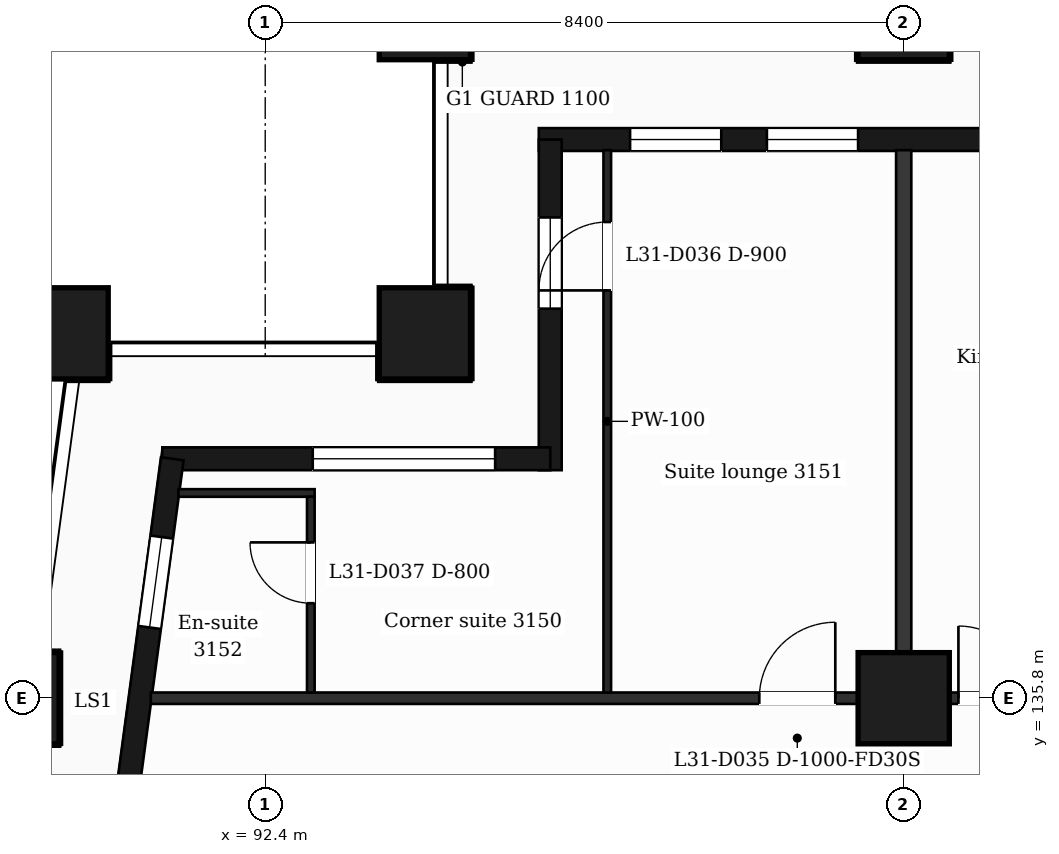
"""IFC4 building model, lengths in metres.
Left out: names, types, materials, properties, quantities, classifications, styles, units other than length and angle.
Written with IfcOpenShell. Run it as: python <this file> out.ifc"""

import sys

from ifc_helpers import new_model, si_unit, direction, frame, frame_2d, origin, origin_2d, place, context, subcontext, project, spatial, rectangle, extrude, element, fill, save


model = new_model("IFC4")
c1 = context("Model", 3, precision=1e-05, world=origin(), true_north=direction((0.0, 1.0)))
c2 = subcontext(c1, "Body", "Model", "MODEL_VIEW")
j1 = project(units=[si_unit("LENGTHUNIT", "METRE"), si_unit("PLANEANGLEUNIT", "RADIAN")], contexts=[c1])
p1 = place(None, origin())
s1 = spatial("IfcSite", under=j1, at=p1, CompositionType="ELEMENT")
p2 = place(p1, origin())
s2 = spatial("IfcBuilding", under=s1, at=p2, CompositionType="ELEMENT")
p3 = place(p2, frame((0.0, 0.0, 131.7)))
s3 = spatial("IfcBuildingStorey", under=s2, at=p3, CompositionType="ELEMENT", Elevation=131.7)
for number, where, z_axis, x_axis in (
    (1, (94.5, 140.6, 0.0), (0.0, 0.0, 1.0), (1.0, 0.0, 0.0)),
    (2, (89.735, 140.6, 0.0), (0.0, 0.0, 1.0), (1.0, 0.0, 0.0)),
    (3, (100.8, 135.8, 0.0), (0.0, 0.0, 1.0), (1.0, 0.0, 0.0)),
    (4, (89.088, 135.8, 0.0), (0.0, 0.0, 1.0), (1.0, 0.0, 0.0)),
    (5, (100.8, 144.8, 0.0), (0.0, 0.0, 1.0), (1.0, 0.0, 0.0)),
    (6, (94.5, 144.8, 0.0), (0.0, 0.0, 1.0), (1.0, 0.0, 0.0)),
):
    element("IfcColumn", number, at=place(p3, frame(where, z_axis=z_axis, x_axis=x_axis)), inside=s3, PredefinedType="COLUMN", context=c2, shape_type="SweptSolid", body=[
        extrude(rectangle(XDim=1.2, YDim=1.2, at=origin_2d()), origin(), (0.0, 0.0, 1.0), 3.7),
    ])
p4 = place(p3, frame((112.5, 143.15, 0.0), z_axis=(0.0, 0.0, 1.0), x_axis=(-1.0, 0.0, 0.0)))
e7 = element("IfcWall", 7, at=p4, inside=s3, PredefinedType="SOLIDWALL", context=c2, shape_type="SweptSolid", body=[
    extrude(rectangle(XDim=16.5, YDim=0.3, at=frame_2d((8.25, 0.0))), origin(), (0.0, 0.0, 1.0), 3.2),
])
p5 = place(p4, frame((1.1, 0.0, 0.9)))
e8 = element("IfcOpeningElement", 8, at=p5, cuts=e7, PredefinedType="OPENING", context=c2, shape_type="SweptSolid", body=[
    extrude(rectangle(XDim=1.2, YDim=2.1, at=frame_2d((0.6, 1.05))), frame((0.0, 0.16, 0.0), z_axis=(0.0, -1.0, 0.0), x_axis=(1.0, 0.0, 0.0)), (0.0, 0.0, 1.0), 0.32),
])
p6 = place(p4, frame((4.2, 0.0, 0.9)))
e9 = element("IfcOpeningElement", 9, at=p6, cuts=e7, PredefinedType="OPENING", context=c2, shape_type="SweptSolid", body=[
    extrude(rectangle(XDim=2.4, YDim=2.1, at=frame_2d((1.2, 1.05))), frame((0.0, 0.16, 0.0), z_axis=(0.0, -1.0, 0.0), x_axis=(1.0, 0.0, 0.0)), (0.0, 0.0, 1.0), 0.32),
])
p7 = place(p4, frame((9.0, 0.0, 0.0)))
e10 = element("IfcOpeningElement", 10, at=p7, cuts=e7, PredefinedType="OPENING", context=c2, shape_type="SweptSolid", body=[
    extrude(rectangle(XDim=1.2, YDim=2.4, at=frame_2d((0.6, 1.2))), frame((0.0, 0.16, 0.0), z_axis=(0.0, -1.0, 0.0), x_axis=(1.0, 0.0, 0.0)), (0.0, 0.0, 1.0), 0.32),
])
p8 = place(p4, frame((12.3, 0.0, 0.9)))
e11 = element("IfcOpeningElement", 11, at=p8, cuts=e7, PredefinedType="OPENING", context=c2, shape_type="SweptSolid", body=[
    extrude(rectangle(XDim=1.2, YDim=2.1, at=frame_2d((0.6, 1.05))), frame((0.0, 0.16, 0.0), z_axis=(0.0, -1.0, 0.0), x_axis=(1.0, 0.0, 0.0)), (0.0, 0.0, 1.0), 0.32),
])
p9 = place(p4, frame((14.1, 0.0, 0.9)))
e12 = element("IfcOpeningElement", 12, at=p9, cuts=e7, PredefinedType="OPENING", context=c2, shape_type="SweptSolid", body=[
    extrude(rectangle(XDim=1.2, YDim=2.1, at=frame_2d((0.6, 1.05))), frame((0.0, 0.16, 0.0), z_axis=(0.0, -1.0, 0.0), x_axis=(1.0, 0.0, 0.0)), (0.0, 0.0, 1.0), 0.32),
])
p10 = place(p3, frame((96.15, 143.15, 0.0), z_axis=(0.0, 0.0, 1.0), x_axis=(0.0, -1.0, 0.0)))
e13 = element("IfcWall", 13, at=p10, inside=s3, PredefinedType="SOLIDWALL", context=c2, shape_type="SweptSolid", body=[
    extrude(rectangle(XDim=4.35, YDim=0.3, at=frame_2d((2.175, 0.0))), origin(), (0.0, 0.0, 1.0), 3.2),
])
p11 = place(p10, frame((1.025, 0.0, 0.9)))
e14 = element("IfcOpeningElement", 14, at=p11, cuts=e13, PredefinedType="OPENING", context=c2, shape_type="SweptSolid", body=[
    extrude(rectangle(XDim=1.2, YDim=2.1, at=frame_2d((0.6, 1.05))), frame((0.0, 0.16, 0.0), z_axis=(0.0, -1.0, 0.0), x_axis=(1.0, 0.0, 0.0)), (0.0, 0.0, 1.0), 0.32),
])
p12 = place(p3, frame((96.15, 138.95, 0.0), z_axis=(0.0, 0.0, 1.0), x_axis=(-1.0, 0.0, 0.0)))
e15 = element("IfcWall", 15, at=p12, inside=s3, PredefinedType="SOLIDWALL", context=c2, shape_type="SweptSolid", body=[
    extrude(rectangle(XDim=5.104, YDim=0.3, at=frame_2d((2.552, 0.0))), origin(), (0.0, 0.0, 1.0), 3.2),
])
p13 = place(p12, frame((0.725, 0.0, 0.9)))
e16 = element("IfcOpeningElement", 16, at=p13, cuts=e15, PredefinedType="OPENING", context=c2, shape_type="SweptSolid", body=[
    extrude(rectangle(XDim=2.4, YDim=2.1, at=frame_2d((1.2, 1.05))), frame((0.0, 0.16, 0.0), z_axis=(0.0, -1.0, 0.0), x_axis=(1.0, 0.0, 0.0)), (0.0, 0.0, 1.0), 0.32),
])
p14 = place(p3, frame((91.177, 138.95, 0.0), z_axis=(0.0, 0.0, 1.0), x_axis=(-0.133426664613, -0.991058689065, 0.0)))
e17 = element("IfcWall", 17, at=p14, inside=s3, PredefinedType="SOLIDWALL", context=c2, shape_type="SweptSolid", body=[
    extrude(rectangle(XDim=6.609, YDim=0.3, at=frame_2d((3.305, 0.0))), origin(), (0.0, 0.0, 1.0), 3.2),
])
p15 = place(p14, frame((1.039, 0.0, 0.9)))
e18 = element("IfcOpeningElement", 18, at=p15, cuts=e17, PredefinedType="OPENING", context=c2, shape_type="SweptSolid", body=[
    extrude(rectangle(XDim=1.2, YDim=2.1, at=frame_2d((0.6, 1.05))), frame((0.0, 0.16, 0.0), z_axis=(0.0, -1.0, 0.0), x_axis=(1.0, 0.0, 0.0)), (0.0, 0.0, 1.0), 0.32),
])
p16 = place(p14, frame((4.294, 0.0, 0.0)))
e19 = element("IfcOpeningElement", 19, at=p16, cuts=e17, PredefinedType="OPENING", context=c2, shape_type="SweptSolid", body=[
    extrude(rectangle(XDim=1.2, YDim=2.4, at=frame_2d((0.6, 1.2))), frame((0.0, 0.16, 0.0), z_axis=(0.0, -1.0, 0.0), x_axis=(1.0, 0.0, 0.0)), (0.0, 0.0, 1.0), 0.32),
])
p17 = place(p3, frame((90.895, 135.8, 0.0), z_axis=(0.0, 0.0, 1.0), x_axis=(1.0, 0.0, 0.0)))
e20 = element("IfcWall", 20, at=p17, inside=s3, PredefinedType="PARTITIONING", context=c2, shape_type="SweptSolid", body=[
    extrude(rectangle(XDim=45.011, YDim=0.15, at=frame_2d((22.505, 0.0))), origin(), (0.0, 0.0, 1.0), 3.2),
])
p18 = place(p17, frame((8.005, 0.0, 0.0)))
e21 = element("IfcOpeningElement", 21, at=p18, cuts=e20, PredefinedType="OPENING", context=c2, shape_type="SweptSolid", body=[
    extrude(rectangle(XDim=1.0, YDim=2.1, at=frame_2d((0.5, 1.05))), frame((0.0, 0.085, 0.0), z_axis=(0.0, -1.0, 0.0), x_axis=(1.0, 0.0, 0.0)), (0.0, 0.0, 1.0), 0.17),
])
p19 = place(p17, frame((10.625, 0.0, 0.0)))
e22 = element("IfcOpeningElement", 22, at=p19, cuts=e20, PredefinedType="OPENING", context=c2, shape_type="SweptSolid", body=[
    extrude(rectangle(XDim=0.95, YDim=2.1, at=frame_2d((0.475, 1.05))), frame((0.0, 0.085, 0.0), z_axis=(0.0, -1.0, 0.0), x_axis=(1.0, 0.0, 0.0)), (0.0, 0.0, 1.0), 0.17),
])
p20 = place(p17, frame((14.38, 0.0, 0.0)))
e23 = element("IfcOpeningElement", 23, at=p20, cuts=e20, PredefinedType="OPENING", context=c2, shape_type="SweptSolid", body=[
    extrude(rectangle(XDim=0.95, YDim=2.1, at=frame_2d((0.475, 1.05))), frame((0.0, 0.085, 0.0), z_axis=(0.0, -1.0, 0.0), x_axis=(1.0, 0.0, 0.0)), (0.0, 0.0, 1.0), 0.17),
])
p21 = place(p17, frame((21.265, 0.0, 0.0)))
e24 = element("IfcOpeningElement", 24, at=p21, cuts=e20, PredefinedType="OPENING", context=c2, shape_type="SweptSolid", body=[
    extrude(rectangle(XDim=0.95, YDim=2.1, at=frame_2d((0.475, 1.05))), frame((0.0, 0.085, 0.0), z_axis=(0.0, -1.0, 0.0), x_axis=(1.0, 0.0, 0.0)), (0.0, 0.0, 1.0), 0.17),
])
p22 = place(p17, frame((30.835, 0.0, 0.0)))
e25 = element("IfcOpeningElement", 25, at=p22, cuts=e20, PredefinedType="OPENING", context=c2, shape_type="SweptSolid", body=[
    extrude(rectangle(XDim=0.95, YDim=2.1, at=frame_2d((0.475, 1.05))), frame((0.0, 0.085, 0.0), z_axis=(0.0, -1.0, 0.0), x_axis=(1.0, 0.0, 0.0)), (0.0, 0.0, 1.0), 0.17),
])
p23 = place(p17, frame((36.555, 0.0, 0.0)))
e26 = element("IfcOpeningElement", 26, at=p23, cuts=e20, PredefinedType="OPENING", context=c2, shape_type="SweptSolid", body=[
    extrude(rectangle(XDim=1.0, YDim=2.1, at=frame_2d((0.5, 1.05))), frame((0.0, 0.085, 0.0), z_axis=(0.0, -1.0, 0.0), x_axis=(1.0, 0.0, 0.0)), (0.0, 0.0, 1.0), 0.17),
])
p24 = place(p3, frame((91.258, 138.5, 0.0), z_axis=(0.0, 0.0, 1.0), x_axis=(1.0, 0.0, 0.0)))
e27 = element("IfcWall", 27, at=p24, inside=s3, PredefinedType="PARTITIONING", context=c2, shape_type="SweptSolid", body=[
    extrude(rectangle(XDim=1.792, YDim=0.1, at=frame_2d((0.896, 0.0))), origin(), (0.0, 0.0, 1.0), 3.2),
])
p25 = place(p3, frame((93.0, 135.875, 0.0), z_axis=(0.0, 0.0, 1.0), x_axis=(0.0, 1.0, 0.0)))
e28 = element("IfcWall", 28, at=p25, inside=s3, PredefinedType="PARTITIONING", context=c2, shape_type="SweptSolid", body=[
    extrude(rectangle(XDim=2.575, YDim=0.1, at=frame_2d((1.288, 0.0))), origin(), (0.0, 0.0, 1.0), 3.2),
])
p26 = place(p25, frame((1.175, 0.0, 0.0)))
e29 = element("IfcOpeningElement", 29, at=p26, cuts=e28, PredefinedType="OPENING", context=c2, shape_type="SweptSolid", body=[
    extrude(rectangle(XDim=0.8, YDim=2.1, at=frame_2d((0.4, 1.05))), frame((0.0, 0.06, 0.0), z_axis=(0.0, -1.0, 0.0), x_axis=(1.0, 0.0, 0.0)), (0.0, 0.0, 1.0), 0.12),
])
p27 = place(p3, frame((96.9, 135.875, 0.0), z_axis=(0.0, 0.0, 1.0), x_axis=(0.0, 1.0, 0.0)))
e30 = element("IfcWall", 30, at=p27, inside=s3, PredefinedType="PARTITIONING", context=c2, shape_type="SweptSolid", body=[
    extrude(rectangle(XDim=7.135, YDim=0.1, at=frame_2d((3.567, 0.0))), origin(), (0.0, 0.0, 1.0), 3.2),
])
p28 = place(p27, frame((5.29, 0.0, 0.0)))
e31 = element("IfcOpeningElement", 31, at=p28, cuts=e30, PredefinedType="OPENING", context=c2, shape_type="SweptSolid", body=[
    extrude(rectangle(XDim=0.9, YDim=2.1, at=frame_2d((0.45, 1.05))), frame((0.0, 0.06, 0.0), z_axis=(0.0, -1.0, 0.0), x_axis=(1.0, 0.0, 0.0)), (0.0, 0.0, 1.0), 0.12),
])
p29 = place(p3, frame((100.8, 135.875, 0.0), z_axis=(0.0, 0.0, 1.0), x_axis=(0.0, 1.0, 0.0)))
e32 = element("IfcWall", 32, at=p29, inside=s3, PredefinedType="PARTITIONING", context=c2, shape_type="SweptSolid", body=[
    extrude(rectangle(XDim=7.135, YDim=0.2, at=frame_2d((3.567, 0.0))), origin(), (0.0, 0.0, 1.0), 3.2),
])
p30 = place(p8, origin())
e33 = element("IfcWindow", 33, at=p30, inside=s3, PartitioningType="SINGLE_PANEL", PredefinedType="WINDOW", context=c2, shape_type="SweptSolid", body=[
    extrude(rectangle(XDim=1.2, YDim=2.1, at=frame_2d((0.6, 1.05))), frame((0.0, 0.03, 0.0), z_axis=(0.0, -1.0, 0.0), x_axis=(1.0, 0.0, 0.0)), (0.0, 0.0, 1.0), 0.06),
])
fill(e11, e33)
p31 = place(p9, origin())
e34 = element("IfcWindow", 34, at=p31, inside=s3, PartitioningType="SINGLE_PANEL", PredefinedType="WINDOW", context=c2, shape_type="SweptSolid", body=[
    extrude(rectangle(XDim=1.2, YDim=2.1, at=frame_2d((0.6, 1.05))), frame((0.0, 0.03, 0.0), z_axis=(0.0, -1.0, 0.0), x_axis=(1.0, 0.0, 0.0)), (0.0, 0.0, 1.0), 0.06),
])
fill(e12, e34)
p32 = place(p11, origin())
e35 = element("IfcWindow", 35, at=p32, inside=s3, PartitioningType="SINGLE_PANEL", PredefinedType="WINDOW", context=c2, shape_type="SweptSolid", body=[
    extrude(rectangle(XDim=1.2, YDim=2.1, at=frame_2d((0.6, 1.05))), frame((0.0, 0.03, 0.0), z_axis=(0.0, -1.0, 0.0), x_axis=(1.0, 0.0, 0.0)), (0.0, 0.0, 1.0), 0.06),
])
fill(e14, e35)
p33 = place(p13, origin())
e36 = element("IfcWindow", 36, at=p33, inside=s3, PartitioningType="SINGLE_PANEL", PredefinedType="WINDOW", context=c2, shape_type="SweptSolid", body=[
    extrude(rectangle(XDim=2.4, YDim=2.1, at=frame_2d((1.2, 1.05))), frame((0.0, 0.03, 0.0), z_axis=(0.0, -1.0, 0.0), x_axis=(1.0, 0.0, 0.0)), (0.0, 0.0, 1.0), 0.06),
])
fill(e16, e36)
p34 = place(p15, origin())
e37 = element("IfcWindow", 37, at=p34, inside=s3, PartitioningType="SINGLE_PANEL", PredefinedType="WINDOW", context=c2, shape_type="SweptSolid", body=[
    extrude(rectangle(XDim=1.2, YDim=2.1, at=frame_2d((0.6, 1.05))), frame((0.0, 0.03, 0.0), z_axis=(0.0, -1.0, 0.0), x_axis=(1.0, 0.0, 0.0)), (0.0, 0.0, 1.0), 0.06),
])
fill(e18, e37)
p35 = place(p18, origin())
e38 = element("IfcDoor", 38, at=p35, inside=s3, OperationType="SINGLE_SWING_RIGHT", PredefinedType="DOOR", context=c2, shape_type="SweptSolid", body=[
    extrude(rectangle(XDim=1.0, YDim=2.1, at=frame_2d((0.5, 1.05))), frame((0.0, 0.025, 0.0), z_axis=(0.0, -1.0, 0.0), x_axis=(1.0, 0.0, 0.0)), (0.0, 0.0, 1.0), 0.05),
])
fill(e21, e38)
p36 = place(p28, origin())
e39 = element("IfcDoor", 39, at=p36, inside=s3, OperationType="SINGLE_SWING_LEFT", PredefinedType="DOOR", context=c2, shape_type="SweptSolid", body=[
    extrude(rectangle(XDim=0.9, YDim=2.1, at=frame_2d((0.45, 1.05))), frame((0.0, 0.025, 0.0), z_axis=(0.0, -1.0, 0.0), x_axis=(1.0, 0.0, 0.0)), (0.0, 0.0, 1.0), 0.05),
])
fill(e31, e39)
p37 = place(p26, origin())
e40 = element("IfcDoor", 40, at=p37, inside=s3, OperationType="SINGLE_SWING_RIGHT", PredefinedType="DOOR", context=c2, shape_type="SweptSolid", body=[
    extrude(rectangle(XDim=0.8, YDim=2.1, at=frame_2d((0.4, 1.05))), frame((0.0, 0.025, 0.0), z_axis=(0.0, -1.0, 0.0), x_axis=(1.0, 0.0, 0.0)), (0.0, 0.0, 1.0), 0.05),
])
fill(e29, e40)
p38 = place(p19, origin())
e41 = element("IfcDoor", 41, at=p38, inside=s3, OperationType="SINGLE_SWING_LEFT", PredefinedType="DOOR", context=c2, shape_type="SweptSolid", body=[
    extrude(rectangle(XDim=0.95, YDim=2.1, at=frame_2d((0.475, 1.05))), frame((0.0, 0.025, 0.0), z_axis=(0.0, -1.0, 0.0), x_axis=(1.0, 0.0, 0.0)), (0.0, 0.0, 1.0), 0.05),
])
fill(e22, e41)
save(model, sys.argv[1])
